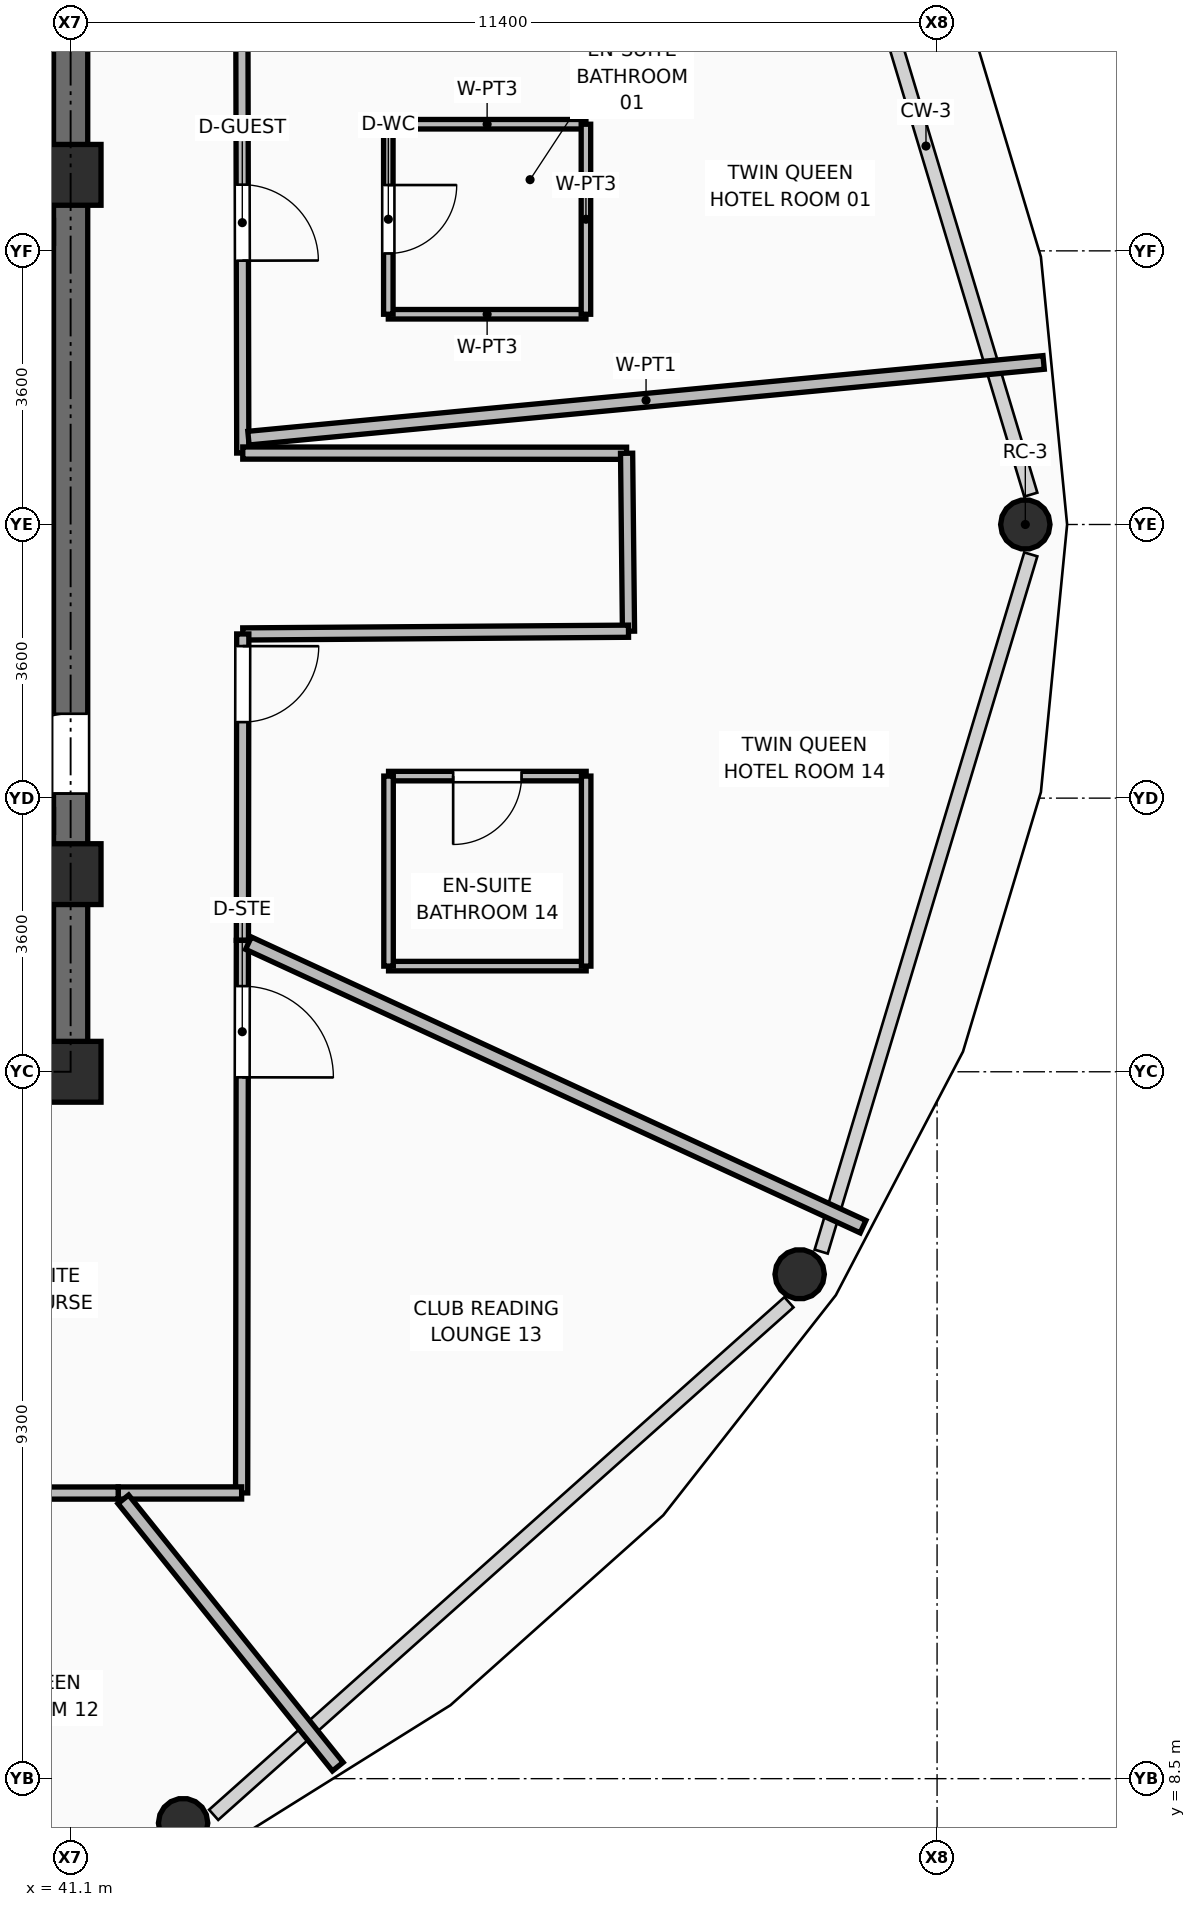
"""IFC4 building model, lengths in metres.
Left out: names, types, materials, properties, quantities, classifications, styles, units other than length and angle.
Written with IfcOpenShell. Run it as: python <this file> out.ifc"""

import sys

from ifc_helpers import new_model, si_unit, direction, frame, frame_2d, origin, origin_2d, place, context, subcontext, project, spatial, rectangle, hollow_circle, extrude, element, fill, save


model = new_model("IFC4")
c1 = context("Model", 3, precision=1e-05, world=origin(), true_north=direction((0.0, 1.0)))
c2 = subcontext(c1, "Body", "Model", "MODEL_VIEW")
j1 = project(units=[si_unit("LENGTHUNIT", "METRE"), si_unit("PLANEANGLEUNIT", "RADIAN")], contexts=[c1])
p1 = place(None, origin())
s1 = spatial("IfcSite", under=j1, at=p1, CompositionType="ELEMENT")
p2 = place(p1, origin())
s2 = spatial("IfcBuilding", under=s1, at=p2, CompositionType="ELEMENT")
p3 = place(p2, frame((0.0, 0.0, 212.4)))
s3 = spatial("IfcBuildingStorey", under=s2, at=p3, CompositionType="ELEMENT", Elevation=212.4)
for number, where, z_axis, x_axis in (
    (1, (41.1, 17.8, 0.0), (0.0, 0.0, 1.0), (1.0, 0.0, 0.0)),
    (2, (41.1, 20.4, 0.0), (0.0, 0.0, 1.0), (1.0, 0.0, 0.0)),
    (3, (41.1, 29.6, 0.0), (0.0, 0.0, 1.0), (1.0, 0.0, 0.0)),
):
    element("IfcColumn", number, at=place(p3, frame(where, z_axis=z_axis, x_axis=x_axis)), inside=s3, PredefinedType="COLUMN", context=c2, shape_type="SweptSolid", body=[
        extrude(rectangle(XDim=0.8, YDim=0.8, at=origin_2d()), origin(), (0.0, 0.0, 1.0), 3.75),
    ])
for number, where, z_axis, x_axis in (
    (4, (53.661, 25.0, 0.0), (-0.021, 0.0, 1.0), (0.0, -1.0, 0.0)),
    (5, (42.58, 7.916, 0.0), (-0.01, 0.016, 1.0), (-0.844, -0.536, 0.0)),
    (6, (50.692, 15.136, 0.0), (-0.018, 0.009, 1.0), (-0.458, -0.889, 0.0)),
):
    element("IfcColumn", number, at=place(p3, frame(where, z_axis=z_axis, x_axis=x_axis)), inside=s3, PredefinedType="COLUMN", context=c2, shape_type="SweptSolid", body=[
        extrude(hollow_circle(Radius=0.325, WallThickness=0.03, at=origin_2d()), origin(), (0.0, 0.0, 1.0), 3.571),
    ])
p4 = place(p3, frame((34.95, 17.8, 0.0), z_axis=(0.0, 0.0, 1.0), x_axis=(1.0, 0.0, 0.0)))
e7 = element("IfcWall", 7, at=p4, inside=s3, PredefinedType="SHEAR", context=c2, shape_type="SweptSolid", body=[
    extrude(rectangle(XDim=6.375, YDim=0.45, at=frame_2d((3.188, 0.0))), origin(), (0.0, 0.0, 1.0), 3.57),
])
p5 = place(p3, frame((41.1, 18.025, 0.0), z_axis=(0.0, 0.0, 1.0), x_axis=(0.0, 1.0, 0.0)))
e8 = element("IfcWall", 8, at=p5, inside=s3, PredefinedType="SHEAR", context=c2, shape_type="SweptSolid", body=[
    extrude(rectangle(XDim=14.2, YDim=0.45, at=frame_2d((7.1, 0.0))), origin(), (0.0, 0.0, 1.0), 3.57),
])
p6 = place(p5, frame((3.435, 0.0, 0.0)))
e9 = element("IfcOpeningElement", 9, at=p6, cuts=e8, PredefinedType="OPENING", context=c2, shape_type="SweptSolid", body=[
    extrude(rectangle(XDim=1.05, YDim=2.1, at=frame_2d((0.525, 1.05))), frame((0.0, 0.235, 0.0), z_axis=(0.0, -1.0, 0.0), x_axis=(1.0, 0.0, 0.0)), (0.0, 0.0, 1.0), 0.47),
])
for number, where, z_axis, x_axis in (
    (10, (37.21, 21.1, 0.0), (0.0, 0.0, 1.0), (1.0, 0.0, 0.0)),
    (11, (37.21, 28.85, 0.0), (0.0, 0.0, 1.0), (1.0, 0.0, 0.0)),
):
    element("IfcWall", number, at=place(p3, frame(where, z_axis=z_axis, x_axis=x_axis)), inside=s3, PredefinedType="SHEAR", context=c2, shape_type="SweptSolid", body=[
        extrude(rectangle(XDim=3.665, YDim=0.3, at=frame_2d((1.833, 0.0))), origin(), (0.0, 0.0, 1.0), 3.57),
    ])
p7 = place(p3, frame((43.353, 31.706, 0.0), z_axis=(0.0, 0.0, 1.0), x_axis=(0.002074684332, -0.99999784784, 0.0)))
e12 = element("IfcWall", 12, at=p7, inside=s3, PredefinedType="PARTITIONING", context=c2, shape_type="SweptSolid", body=[
    extrude(rectangle(XDim=5.766, YDim=0.16, at=frame_2d((2.883, 0.0))), origin(), (0.0, 0.0, 1.0), 3.55),
])
p8 = place(p7, frame((2.235, 0.0, 0.0)))
e13 = element("IfcOpeningElement", 13, at=p8, cuts=e12, PredefinedType="OPENING", context=c2, shape_type="SweptSolid", body=[
    extrude(rectangle(XDim=1.0, YDim=2.1, at=frame_2d((0.5, 1.05))), frame((0.0, 0.09, 0.0), z_axis=(0.0, -1.0, 0.0), x_axis=(1.0, 0.0, 0.0)), (0.0, 0.0, 1.0), 0.18),
])
p9 = place(p3, frame((43.365, 25.94, 0.0), z_axis=(0.0, 0.0, 1.0), x_axis=(0.999999831724, -0.000580130432, 0.0)))
e14 = element("IfcWall", 14, at=p9, inside=s3, PredefinedType="PARTITIONING", context=c2, shape_type="SweptSolid", body=[
    extrude(rectangle(XDim=5.05, YDim=0.16, at=frame_2d((2.525, 0.0))), origin(), (0.0, 0.0, 1.0), 3.55),
])
p10 = place(p3, frame((48.415, 25.937, 0.0), z_axis=(0.0, 0.0, 1.0), x_axis=(0.010636586698, -0.999943429912, 0.0)))
e15 = element("IfcWall", 15, at=p10, inside=s3, PredefinedType="PARTITIONING", context=c2, shape_type="SweptSolid", body=[
    extrude(rectangle(XDim=2.341, YDim=0.16, at=frame_2d((1.171, 0.0))), origin(), (0.0, 0.0, 1.0), 3.55),
])
p11 = place(p3, frame((48.44, 23.596, 0.0), z_axis=(0.0, 0.0, 1.0), x_axis=(-0.999974996273, -0.007071550702, 0.0)))
e16 = element("IfcWall", 16, at=p11, inside=s3, PredefinedType="PARTITIONING", context=c2, shape_type="SweptSolid", body=[
    extrude(rectangle(XDim=5.075, YDim=0.16, at=frame_2d((2.538, 0.0))), origin(), (0.0, 0.0, 1.0), 3.55),
])
p12 = place(p3, frame((43.365, 23.56, 0.0), z_axis=(0.0, 0.0, 1.0), x_axis=(-0.001211312781, -0.99999926636, 0.0)))
e17 = element("IfcWall", 17, at=p12, inside=s3, PredefinedType="PARTITIONING", context=c2, shape_type="SweptSolid", body=[
    extrude(rectangle(XDim=4.031, YDim=0.16, at=frame_2d((2.016, 0.0))), origin(), (0.0, 0.0, 1.0), 3.081),
])
p13 = place(p12, frame((0.16, 0.0, 0.0)))
e18 = element("IfcOpeningElement", 18, at=p13, cuts=e17, PredefinedType="OPENING", context=c2, shape_type="SweptSolid", body=[
    extrude(rectangle(XDim=1.0, YDim=2.1, at=frame_2d((0.5, 1.05))), frame((0.0, 0.09, 0.0), z_axis=(0.0, -1.0, 0.0), x_axis=(1.0, 0.0, 0.0)), (0.0, 0.0, 1.0), 0.18),
])
p14 = place(p3, frame((43.36, 19.529, 0.0), z_axis=(0.0, 0.0, 1.0), x_axis=(-0.001376854092, -0.999999052136, 0.0)))
e19 = element("IfcWall", 19, at=p14, inside=s3, PredefinedType="PARTITIONING", context=c2, shape_type="SweptSolid", body=[
    extrude(rectangle(XDim=7.27, YDim=0.16, at=frame_2d((3.635, 0.0))), origin(), (0.0, 0.0, 1.0), 3.081),
])
p15 = place(p14, frame((0.602, 0.0, 0.0)))
e20 = element("IfcOpeningElement", 20, at=p15, cuts=e19, PredefinedType="OPENING", context=c2, shape_type="SweptSolid", body=[
    extrude(rectangle(XDim=1.2, YDim=2.1, at=frame_2d((0.6, 1.05))), frame((0.0, 0.09, 0.0), z_axis=(0.0, -1.0, 0.0), x_axis=(1.0, 0.0, 0.0)), (0.0, 0.0, 1.0), 0.18),
])
p16 = place(p3, frame((43.35, 12.259, 0.0), z_axis=(0.0, 0.0, 1.0), x_axis=(-0.999999819205, -0.000601322802, 0.0)))
e21 = element("IfcWall", 21, at=p16, inside=s3, PredefinedType="PARTITIONING", context=c2, shape_type="SweptSolid", body=[
    extrude(rectangle(XDim=1.624, YDim=0.16, at=frame_2d((0.812, 0.0))), origin(), (0.0, 0.0, 1.0), 3.081),
])
p17 = place(p3, frame((41.726, 12.258, 0.0), z_axis=(0.0, 0.0, 1.0), x_axis=(-0.999999631492, -0.000858495835, 0.0)))
e22 = element("IfcWall", 22, at=p17, inside=s3, PredefinedType="PARTITIONING", context=c2, shape_type="SweptSolid", body=[
    extrude(rectangle(XDim=8.247, YDim=0.16, at=frame_2d((4.124, 0.0))), origin(), (0.0, 0.0, 1.0), 3.081),
])
p18 = place(p17, frame((3.55, 0.0, 0.0)))
e23 = element("IfcOpeningElement", 23, at=p18, cuts=e22, PredefinedType="OPENING", context=c2, shape_type="SweptSolid", body=[
    extrude(rectangle(XDim=1.0, YDim=2.1, at=frame_2d((0.5, 1.05))), frame((0.0, 0.09, 0.0), z_axis=(0.0, -1.0, 0.0), x_axis=(1.0, 0.0, 0.0)), (0.0, 0.0, 1.0), 0.18),
])
p19 = place(p3, frame((43.44, 26.136, 0.0), z_axis=(0.0, 0.0, 1.0), x_axis=(0.995498186765, 0.094780589504, 0.0)))
e24 = element("IfcWall", 24, at=p19, inside=s3, PredefinedType="PARTITIONING", context=c2, shape_type="SweptSolid", body=[
    extrude(rectangle(XDim=10.51, YDim=0.18, at=frame_2d((5.255, 0.0))), origin(), (0.0, 0.0, 1.0), 2.925),
])
p20 = place(p3, frame((41.793, 12.175, 0.0), z_axis=(0.0, 0.0, 1.0), x_axis=(0.625823446247, -0.77996475185, 0.0)))
e25 = element("IfcWall", 25, at=p20, inside=s3, PredefinedType="PARTITIONING", context=c2, shape_type="SweptSolid", body=[
    extrude(rectangle(XDim=4.509, YDim=0.18, at=frame_2d((2.255, 0.0))), origin(), (0.0, 0.0, 1.0), 2.925),
])
p21 = place(p3, frame((43.44, 19.492, 0.0), z_axis=(0.0, 0.0, 1.0), x_axis=(0.908044424748, -0.418873874435, 0.0)))
e26 = element("IfcWall", 26, at=p21, inside=s3, PredefinedType="PARTITIONING", context=c2, shape_type="SweptSolid", body=[
    extrude(rectangle(XDim=8.905, YDim=0.18, at=frame_2d((4.452, 0.0))), origin(), (0.0, 0.0, 1.0), 2.925),
])
for number, where, z_axis, x_axis in (
    (27, (45.28, 27.766, 0.0), (0.0, 0.0, 1.0), (1.0, 0.0, 0.0)),
    (28, (45.28, 30.266, 0.0), (0.0, 0.0, 1.0), (1.0, 0.0, 0.0)),
):
    element("IfcWall", number, at=place(p3, frame(where, z_axis=z_axis, x_axis=x_axis)), inside=s3, PredefinedType="PARTITIONING", context=c2, shape_type="SweptSolid", body=[
        extrude(rectangle(XDim=2.6, YDim=0.125, at=frame_2d((1.3, 0.0))), origin(), (0.0, 0.0, 1.0), 3.55),
    ])
p22 = place(p3, frame((45.28, 27.766, 0.0), z_axis=(0.0, 0.0, 1.0), x_axis=(0.0, 1.0, 0.0)))
e29 = element("IfcWall", 29, at=p22, inside=s3, PredefinedType="PARTITIONING", context=c2, shape_type="SweptSolid", body=[
    extrude(rectangle(XDim=2.5, YDim=0.125, at=frame_2d((1.25, 0.0))), origin(), (0.0, 0.0, 1.0), 3.55),
])
p23 = place(p22, frame((0.8, 0.0, 0.0)))
e30 = element("IfcOpeningElement", 30, at=p23, cuts=e29, PredefinedType="OPENING", context=c2, shape_type="SweptSolid", body=[
    extrude(rectangle(XDim=0.9, YDim=2.1, at=frame_2d((0.45, 1.05))), frame((0.0, 0.073, 0.0), z_axis=(0.0, -1.0, 0.0), x_axis=(1.0, 0.0, 0.0)), (0.0, 0.0, 1.0), 0.145),
])
p24 = place(p3, frame((47.88, 27.766, 0.0), z_axis=(0.0, 0.0, 1.0), x_axis=(0.0, 1.0, 0.0)))
e31 = element("IfcWall", 31, at=p24, inside=s3, PredefinedType="PARTITIONING", context=c2, shape_type="SweptSolid", body=[
    extrude(rectangle(XDim=2.5, YDim=0.125, at=frame_2d((1.25, 0.0))), origin(), (0.0, 0.0, 1.0), 3.55),
])
p25 = place(p3, frame((45.283, 19.19, 0.0), z_axis=(0.0, 0.0, 1.0), x_axis=(1.0, 0.0, 0.0)))
e32 = element("IfcWall", 32, at=p25, inside=s3, PredefinedType="PARTITIONING", context=c2, shape_type="SweptSolid", body=[
    extrude(rectangle(XDim=2.6, YDim=0.125, at=frame_2d((1.3, 0.0))), origin(), (0.0, 0.0, 1.0), 3.55),
])
p26 = place(p3, frame((45.283, 21.69, 0.0), z_axis=(0.0, 0.0, 1.0), x_axis=(1.0, 0.0, 0.0)))
e33 = element("IfcWall", 33, at=p26, inside=s3, PredefinedType="PARTITIONING", context=c2, shape_type="SweptSolid", body=[
    extrude(rectangle(XDim=2.6, YDim=0.125, at=frame_2d((1.3, 0.0))), origin(), (0.0, 0.0, 1.0), 3.081),
])
p27 = place(p26, frame((0.85, 0.0, 0.0)))
e34 = element("IfcOpeningElement", 34, at=p27, cuts=e33, PredefinedType="OPENING", context=c2, shape_type="SweptSolid", body=[
    extrude(rectangle(XDim=0.9, YDim=2.1, at=frame_2d((0.45, 1.05))), frame((0.0, 0.073, 0.0), z_axis=(0.0, -1.0, 0.0), x_axis=(1.0, 0.0, 0.0)), (0.0, 0.0, 1.0), 0.145),
])
p28 = place(p3, frame((45.283, 19.19, 0.0), z_axis=(0.0, 0.0, 1.0), x_axis=(0.0, 1.0, 0.0)))
e35 = element("IfcWall", 35, at=p28, inside=s3, PredefinedType="PARTITIONING", context=c2, shape_type="SweptSolid", body=[
    extrude(rectangle(XDim=2.5, YDim=0.125, at=frame_2d((1.25, 0.0))), origin(), (0.0, 0.0, 1.0), 3.081),
])
p29 = place(p3, frame((47.883, 19.19, 0.0), z_axis=(0.0, 0.0, 1.0), x_axis=(0.0, 1.0, 0.0)))
e36 = element("IfcWall", 36, at=p29, inside=s3, PredefinedType="PARTITIONING", context=c2, shape_type="SweptSolid", body=[
    extrude(rectangle(XDim=2.5, YDim=0.125, at=frame_2d((1.25, 0.0))), origin(), (0.0, 0.0, 1.0), 3.55),
])
p30 = place(p6, origin())
e37 = element("IfcDoor", 37, at=p30, inside=s3, OperationType="SINGLE_SWING_LEFT", PredefinedType="DOOR", context=c2, shape_type="SweptSolid", body=[
    extrude(rectangle(XDim=1.05, YDim=2.1, at=frame_2d((0.525, 1.05))), frame((0.0, 0.025, 0.0), z_axis=(0.0, -1.0, 0.0), x_axis=(1.0, 0.0, 0.0)), (0.0, 0.0, 1.0), 0.05),
])
fill(e9, e37)
p31 = place(p23, frame((0.9, 0.0, 0.0), z_axis=(0.0, 0.0, 1.0), x_axis=(-1.0, 0.0, 0.0)))
e38 = element("IfcDoor", 38, at=p31, inside=s3, OperationType="SINGLE_SWING_LEFT", PredefinedType="DOOR", context=c2, shape_type="SweptSolid", body=[
    extrude(rectangle(XDim=0.9, YDim=2.1, at=frame_2d((0.45, 1.05))), frame((0.0, 0.025, 0.0), z_axis=(0.0, -1.0, 0.0), x_axis=(1.0, 0.0, 0.0)), (0.0, 0.0, 1.0), 0.05),
])
fill(e30, e38)
p32 = place(p8, origin())
e39 = element("IfcDoor", 39, at=p32, inside=s3, OperationType="SINGLE_SWING_RIGHT", PredefinedType="DOOR", context=c2, shape_type="SweptSolid", body=[
    extrude(rectangle(XDim=1.0, YDim=2.1, at=frame_2d((0.5, 1.05))), frame((0.0, 0.025, 0.0), z_axis=(0.0, -1.0, 0.0), x_axis=(1.0, 0.0, 0.0)), (0.0, 0.0, 1.0), 0.05),
])
fill(e13, e39)
p33 = place(p15, origin())
e40 = element("IfcDoor", 40, at=p33, inside=s3, OperationType="SINGLE_SWING_RIGHT", PredefinedType="DOOR", context=c2, shape_type="SweptSolid", body=[
    extrude(rectangle(XDim=1.2, YDim=2.1, at=frame_2d((0.6, 1.05))), frame((0.0, 0.025, 0.0), z_axis=(0.0, -1.0, 0.0), x_axis=(1.0, 0.0, 0.0)), (0.0, 0.0, 1.0), 0.05),
])
fill(e20, e40)
p34 = place(p27, frame((0.9, 0.0, 0.0), z_axis=(0.0, 0.0, 1.0), x_axis=(-1.0, 0.0, 0.0)))
e41 = element("IfcDoor", 41, at=p34, inside=s3, OperationType="SINGLE_SWING_RIGHT", PredefinedType="DOOR", context=c2, shape_type="SweptSolid", body=[
    extrude(rectangle(XDim=0.9, YDim=2.1, at=frame_2d((0.45, 1.05))), frame((0.0, 0.025, 0.0), z_axis=(0.0, -1.0, 0.0), x_axis=(1.0, 0.0, 0.0)), (0.0, 0.0, 1.0), 0.05),
])
fill(e34, e41)
p35 = place(p13, origin())
e42 = element("IfcDoor", 42, at=p35, inside=s3, OperationType="SINGLE_SWING_LEFT", PredefinedType="DOOR", context=c2, shape_type="SweptSolid", body=[
    extrude(rectangle(XDim=1.0, YDim=2.1, at=frame_2d((0.5, 1.05))), frame((0.0, 0.025, 0.0), z_axis=(0.0, -1.0, 0.0), x_axis=(1.0, 0.0, 0.0)), (0.0, 0.0, 1.0), 0.05),
])
fill(e18, e42)
save(model, sys.argv[1])
